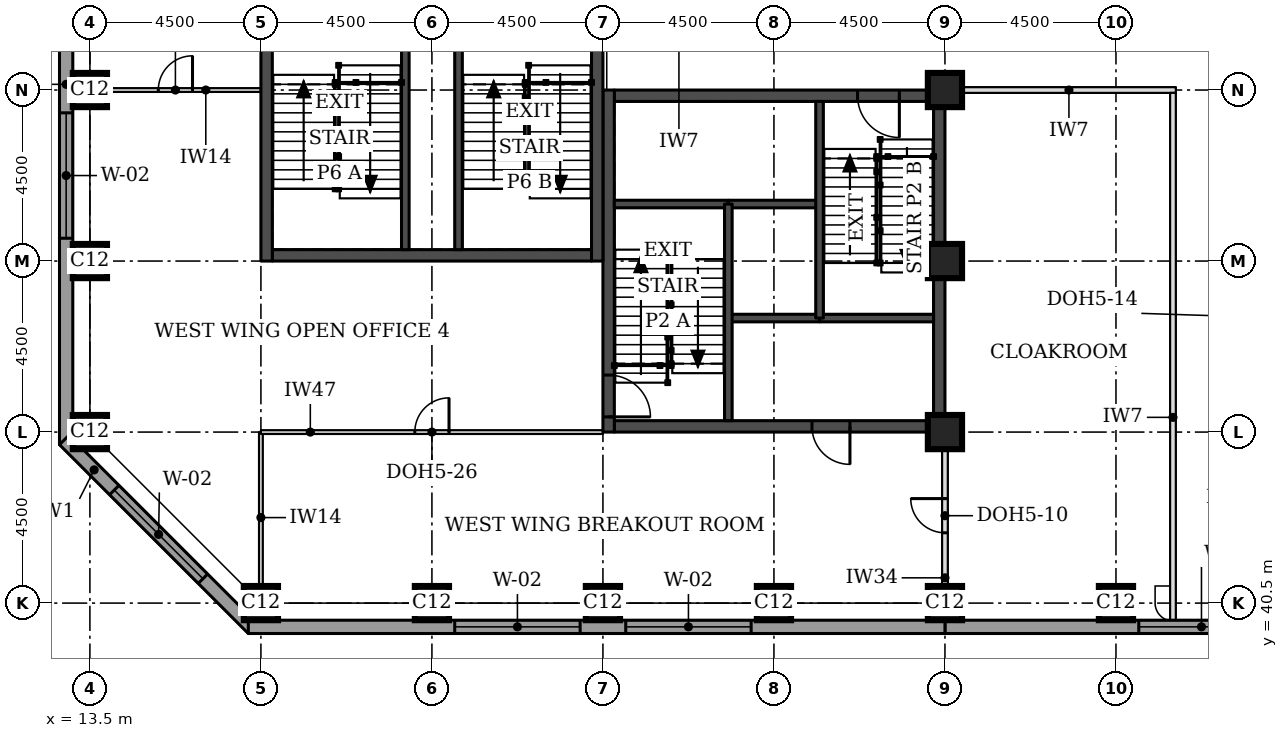
"""IFC4 building model, lengths in metres.
Left out: names, types, materials, properties, quantities, classifications, styles, units other than length and angle.
Written with IfcOpenShell. Run it as: python <this file> out.ifc"""

import sys

from ifc_helpers import new_model, si_unit, direction, frame, frame_2d, origin, origin_2d, place, context, subcontext, project, spatial, rectangle, extrude, element, fill, save


model = new_model("IFC4")
c1 = context("Model", 3, precision=1e-05, world=origin(), true_north=direction((0.0, 1.0)))
c2 = subcontext(c1, "Body", "Model", "MODEL_VIEW")
j1 = project(units=[si_unit("LENGTHUNIT", "METRE"), si_unit("PLANEANGLEUNIT", "RADIAN")], contexts=[c1])
p1 = place(None, origin())
s1 = spatial("IfcSite", under=j1, at=p1, CompositionType="ELEMENT")
p2 = place(p1, origin())
s2 = spatial("IfcBuilding", under=s1, at=p2, CompositionType="ELEMENT")
p3 = place(p2, frame((0.0, 0.0, 181.0)))
s3 = spatial("IfcBuildingStorey", under=s2, at=p3, CompositionType="ELEMENT", Elevation=181.0)
for number, where, z_axis, x_axis in (
    (1, (18.0, 40.5, 0.0), (0.0, 0.0, 1.0), (1.0, 0.0, 0.0)),
    (2, (22.5, 40.5, 0.0), (0.0, 0.0, 1.0), (1.0, 0.0, 0.0)),
    (3, (27.0, 40.5, 0.0), (0.0, 0.0, 1.0), (1.0, 0.0, 0.0)),
    (4, (31.5, 40.5, 0.0), (0.0, 0.0, 1.0), (1.0, 0.0, 0.0)),
    (5, (36.0, 40.5, 0.0), (0.0, 0.0, 1.0), (1.0, 0.0, 0.0)),
    (6, (40.5, 40.5, 0.0), (0.0, 0.0, 1.0), (1.0, 0.0, 0.0)),
    (7, (13.5, 45.0, 0.0), (0.0, 0.0, 1.0), (1.0, 0.0, 0.0)),
    (8, (36.0, 45.0, 0.0), (0.0, 0.0, 1.0), (1.0, 0.0, 0.0)),
    (9, (13.5, 49.5, 0.0), (0.0, 0.0, 1.0), (1.0, 0.0, 0.0)),
    (10, (36.0, 49.5, 0.0), (0.0, 0.0, 1.0), (1.0, 0.0, 0.0)),
    (11, (13.5, 54.0, 0.0), (0.0, 0.0, 1.0), (1.0, 0.0, 0.0)),
    (12, (36.0, 54.0, 0.0), (0.0, 0.0, 1.0), (1.0, 0.0, 0.0)),
):
    element("IfcColumn", number, at=place(p3, frame(where, z_axis=z_axis, x_axis=x_axis)), inside=s3, PredefinedType="COLUMN", context=c2, shape_type="SweptSolid", body=[
        extrude(rectangle(XDim=0.9, YDim=0.9, at=origin_2d()), origin(), (0.0, 0.0, 1.0), 3.7),
    ])
p4 = place(p3, frame((27.3, 45.15, 0.0), z_axis=(0.0, 0.0, 1.0), x_axis=(1.0, 0.0, 0.0)))
e13 = element("IfcWall", 13, at=p4, inside=s3, PredefinedType="SHEAR", context=c2, shape_type="SweptSolid", body=[
    extrude(rectangle(XDim=8.4, YDim=0.3, at=frame_2d((4.2, 0.0))), origin(), (0.0, 0.0, 1.0), 3.7),
])
p5 = place(p4, frame((5.2, 0.0, 0.0)))
e14 = element("IfcOpeningElement", 14, at=p5, cuts=e13, PredefinedType="OPENING", context=c2, shape_type="SweptSolid", body=[
    extrude(rectangle(XDim=1.0, YDim=2.1, at=frame_2d((0.5, 1.05))), frame((0.0, 0.16, 0.0), z_axis=(0.0, -1.0, 0.0), x_axis=(1.0, 0.0, 0.0)), (0.0, 0.0, 1.0), 0.32),
])
p6 = place(p3, frame((27.3, 53.85, 0.0), z_axis=(0.0, 0.0, 1.0), x_axis=(1.0, 0.0, 0.0)))
e15 = element("IfcWall", 15, at=p6, inside=s3, PredefinedType="SHEAR", context=c2, shape_type="SweptSolid", body=[
    extrude(rectangle(XDim=8.4, YDim=0.3, at=frame_2d((4.2, 0.0))), origin(), (0.0, 0.0, 1.0), 3.7),
])
p7 = place(p6, frame((6.4, 0.0, 0.0)))
e16 = element("IfcOpeningElement", 16, at=p7, cuts=e15, PredefinedType="OPENING", context=c2, shape_type="SweptSolid", body=[
    extrude(rectangle(XDim=1.1, YDim=2.1, at=frame_2d((0.55, 1.05))), frame((0.0, 0.16, 0.0), z_axis=(0.0, -1.0, 0.0), x_axis=(1.0, 0.0, 0.0)), (0.0, 0.0, 1.0), 0.32),
])
p8 = place(p3, frame((27.15, 45.0, 0.0), z_axis=(0.0, 0.0, 1.0), x_axis=(0.0, 1.0, 0.0)))
e17 = element("IfcWall", 17, at=p8, inside=s3, PredefinedType="SHEAR", context=c2, shape_type="SweptSolid", body=[
    extrude(rectangle(XDim=9.0, YDim=0.3, at=frame_2d((4.5, 0.0))), origin(), (0.0, 0.0, 1.0), 3.7),
])
p9 = place(p8, frame((0.4, 0.0, 0.0)))
e18 = element("IfcOpeningElement", 18, at=p9, cuts=e17, PredefinedType="OPENING", context=c2, shape_type="SweptSolid", body=[
    extrude(rectangle(XDim=1.1, YDim=2.1, at=frame_2d((0.55, 1.05))), frame((0.0, 0.16, 0.0), z_axis=(0.0, -1.0, 0.0), x_axis=(1.0, 0.0, 0.0)), (0.0, 0.0, 1.0), 0.32),
])
p10 = place(p3, frame((35.85, 45.0, 0.0), z_axis=(0.0, 0.0, 1.0), x_axis=(0.0, 1.0, 0.0)))
e19 = element("IfcWall", 19, at=p10, inside=s3, PredefinedType="SHEAR", context=c2, shape_type="SweptSolid", body=[
    extrude(rectangle(XDim=9.0, YDim=0.3, at=frame_2d((4.5, 0.0))), origin(), (0.0, 0.0, 1.0), 3.7),
])
p11 = place(p3, frame((18.3, 49.65, 0.0), z_axis=(0.0, 0.0, 1.0), x_axis=(1.0, 0.0, 0.0)))
e20 = element("IfcWall", 20, at=p11, inside=s3, PredefinedType="SHEAR", context=c2, shape_type="SweptSolid", body=[
    extrude(rectangle(XDim=8.4, YDim=0.3, at=frame_2d((4.2, 0.0))), origin(), (0.0, 0.0, 1.0), 3.7),
])
p12 = place(p3, frame((18.15, 49.5, 0.0), z_axis=(0.0, 0.0, 1.0), x_axis=(0.0, 1.0, 0.0)))
e21 = element("IfcWall", 21, at=p12, inside=s3, PredefinedType="SHEAR", context=c2, shape_type="SweptSolid", body=[
    extrude(rectangle(XDim=9.0, YDim=0.3, at=frame_2d((4.5, 0.0))), origin(), (0.0, 0.0, 1.0), 3.7),
])
p13 = place(p3, frame((26.85, 49.5, 0.0), z_axis=(0.0, 0.0, 1.0), x_axis=(0.0, 1.0, 0.0)))
e22 = element("IfcWall", 22, at=p13, inside=s3, PredefinedType="SHEAR", context=c2, shape_type="SweptSolid", body=[
    extrude(rectangle(XDim=9.0, YDim=0.3, at=frame_2d((4.5, 0.0))), origin(), (0.0, 0.0, 1.0), 3.7),
])
p14 = place(p13, frame((6.6, 0.0, 0.0)))
e23 = element("IfcOpeningElement", 23, at=p14, cuts=e22, PredefinedType="OPENING", context=c2, shape_type="SweptSolid", body=[
    extrude(rectangle(XDim=1.8, YDim=2.1, at=frame_2d((0.9, 1.05))), frame((0.0, 0.16, 0.0), z_axis=(0.0, -1.0, 0.0), x_axis=(1.0, 0.0, 0.0)), (0.0, 0.0, 1.0), 0.32),
])
p15 = place(p3, frame((36.0, 39.875, 0.0), z_axis=(0.0, 0.0, 1.0), x_axis=(1.0, 0.0, 0.0)))
e24 = element("IfcWall", 24, at=p15, inside=s3, PredefinedType="STANDARD", context=c2, shape_type="SweptSolid", body=[
    extrude(rectangle(XDim=36.331, YDim=0.35, at=frame_2d((18.166, 0.0))), origin(), (0.0, 0.0, 1.0), 3.525),
])
p16 = place(p15, frame((5.1, 0.0, 0.9)))
e25 = element("IfcOpeningElement", 25, at=p16, cuts=e24, PredefinedType="OPENING", context=c2, shape_type="SweptSolid", body=[
    extrude(rectangle(XDim=3.3, YDim=1.9, at=frame_2d((1.65, 0.95))), frame((0.0, 0.185, 0.0), z_axis=(0.0, -1.0, 0.0), x_axis=(1.0, 0.0, 0.0)), (0.0, 0.0, 1.0), 0.37),
])
p17 = place(p15, frame((9.6, 0.0, 0.9)))
e26 = element("IfcOpeningElement", 26, at=p17, cuts=e24, PredefinedType="OPENING", context=c2, shape_type="SweptSolid", body=[
    extrude(rectangle(XDim=3.3, YDim=1.9, at=frame_2d((1.65, 0.95))), frame((0.0, 0.185, 0.0), z_axis=(0.0, -1.0, 0.0), x_axis=(1.0, 0.0, 0.0)), (0.0, 0.0, 1.0), 0.37),
])
p18 = place(p15, frame((14.1, 0.0, 0.9)))
e27 = element("IfcOpeningElement", 27, at=p18, cuts=e24, PredefinedType="OPENING", context=c2, shape_type="SweptSolid", body=[
    extrude(rectangle(XDim=3.3, YDim=1.9, at=frame_2d((1.65, 0.95))), frame((0.0, 0.185, 0.0), z_axis=(0.0, -1.0, 0.0), x_axis=(1.0, 0.0, 0.0)), (0.0, 0.0, 1.0), 0.37),
])
p19 = place(p15, frame((18.6, 0.0, 0.9)))
e28 = element("IfcOpeningElement", 28, at=p19, cuts=e24, PredefinedType="OPENING", context=c2, shape_type="SweptSolid", body=[
    extrude(rectangle(XDim=3.3, YDim=1.9, at=frame_2d((1.65, 0.95))), frame((0.0, 0.185, 0.0), z_axis=(0.0, -1.0, 0.0), x_axis=(1.0, 0.0, 0.0)), (0.0, 0.0, 1.0), 0.37),
])
p20 = place(p15, frame((23.1, 0.0, 0.9)))
e29 = element("IfcOpeningElement", 29, at=p20, cuts=e24, PredefinedType="OPENING", context=c2, shape_type="SweptSolid", body=[
    extrude(rectangle(XDim=3.3, YDim=1.9, at=frame_2d((1.65, 0.95))), frame((0.0, 0.185, 0.0), z_axis=(0.0, -1.0, 0.0), x_axis=(1.0, 0.0, 0.0)), (0.0, 0.0, 1.0), 0.37),
])
p21 = place(p15, frame((27.6, 0.0, 0.9)))
e30 = element("IfcOpeningElement", 30, at=p21, cuts=e24, PredefinedType="OPENING", context=c2, shape_type="SweptSolid", body=[
    extrude(rectangle(XDim=3.3, YDim=1.9, at=frame_2d((1.65, 0.95))), frame((0.0, 0.185, 0.0), z_axis=(0.0, -1.0, 0.0), x_axis=(1.0, 0.0, 0.0)), (0.0, 0.0, 1.0), 0.37),
])
p22 = place(p3, frame((12.875, 58.831, 0.0), z_axis=(0.0, 0.0, 1.0), x_axis=(0.0, -1.0, 0.0)))
e31 = element("IfcWall", 31, at=p22, inside=s3, PredefinedType="STANDARD", context=c2, shape_type="SweptSolid", body=[
    extrude(rectangle(XDim=14.163, YDim=0.35, at=frame_2d((7.081, 0.0))), origin(), (0.0, 0.0, 1.0), 3.525),
])
p23 = place(p22, frame((5.431, 0.0, 0.9)))
e32 = element("IfcOpeningElement", 32, at=p23, cuts=e31, PredefinedType="OPENING", context=c2, shape_type="SweptSolid", body=[
    extrude(rectangle(XDim=3.3, YDim=1.9, at=frame_2d((1.65, 0.95))), frame((0.0, 0.185, 0.0), z_axis=(0.0, -1.0, 0.0), x_axis=(1.0, 0.0, 0.0)), (0.0, 0.0, 1.0), 0.37),
])
p24 = place(p3, frame((12.824, 44.792, 0.0), z_axis=(0.0, 0.0, 1.0), x_axis=(0.707106781187, -0.707106781187, 0.0)))
e33 = element("IfcWall", 33, at=p24, inside=s3, PredefinedType="STANDARD", context=c2, shape_type="SweptSolid", body=[
    extrude(rectangle(XDim=7.027, YDim=0.35, at=frame_2d((3.513, 0.0))), origin(), (0.0, 0.0, 1.0), 3.525),
])
p25 = place(p24, frame((1.863, 0.0, 0.9)))
e34 = element("IfcOpeningElement", 34, at=p25, cuts=e33, PredefinedType="OPENING", context=c2, shape_type="SweptSolid", body=[
    extrude(rectangle(XDim=3.3, YDim=1.9, at=frame_2d((1.65, 0.95))), frame((0.0, 0.185, 0.0), z_axis=(0.0, -1.0, 0.0), x_axis=(1.0, 0.0, 0.0)), (0.0, 0.0, 1.0), 0.37),
])
p26 = place(p3, frame((17.669, 39.875, 0.0), z_axis=(0.0, 0.0, 1.0), x_axis=(1.0, 0.0, 0.0)))
e35 = element("IfcWall", 35, at=p26, inside=s3, PredefinedType="STANDARD", context=c2, shape_type="SweptSolid", body=[
    extrude(rectangle(XDim=18.331, YDim=0.35, at=frame_2d((9.166, 0.0))), origin(), (0.0, 0.0, 1.0), 3.525),
])
p27 = place(p26, frame((5.431, 0.0, 0.9)))
e36 = element("IfcOpeningElement", 36, at=p27, cuts=e35, PredefinedType="OPENING", context=c2, shape_type="SweptSolid", body=[
    extrude(rectangle(XDim=3.3, YDim=1.9, at=frame_2d((1.65, 0.95))), frame((0.0, 0.185, 0.0), z_axis=(0.0, -1.0, 0.0), x_axis=(1.0, 0.0, 0.0)), (0.0, 0.0, 1.0), 0.37),
])
p28 = place(p26, frame((9.931, 0.0, 0.9)))
e37 = element("IfcOpeningElement", 37, at=p28, cuts=e35, PredefinedType="OPENING", context=c2, shape_type="SweptSolid", body=[
    extrude(rectangle(XDim=3.3, YDim=1.9, at=frame_2d((1.65, 0.95))), frame((0.0, 0.185, 0.0), z_axis=(0.0, -1.0, 0.0), x_axis=(1.0, 0.0, 0.0)), (0.0, 0.0, 1.0), 0.37),
])
p29 = place(p3, frame((36.45, 54.0, 0.0), z_axis=(0.0, 0.0, 1.0), x_axis=(1.0, 0.0, 0.0)))
e38 = element("IfcWall", 38, at=p29, inside=s3, PredefinedType="PARTITIONING", context=c2, shape_type="SweptSolid", body=[
    extrude(rectangle(XDim=5.625, YDim=0.15, at=frame_2d((2.812, 0.0))), origin(), (0.0, 0.0, 1.0), 3.55),
])
p30 = place(p3, frame((42.0, 40.05, 0.0), z_axis=(0.0, 0.0, 1.0), x_axis=(0.0, 1.0, 0.0)))
e39 = element("IfcWall", 39, at=p30, inside=s3, PredefinedType="PARTITIONING", context=c2, shape_type="SweptSolid", body=[
    extrude(rectangle(XDim=13.875, YDim=0.15, at=frame_2d((6.938, 0.0))), origin(), (0.0, 0.0, 1.0), 3.55),
])
p31 = place(p3, frame((36.0, 40.95, 0.0), z_axis=(0.0, 0.0, 1.0), x_axis=(0.0, 1.0, 0.0)))
e40 = element("IfcWall", 40, at=p31, inside=s3, PredefinedType="PARTITIONING", context=c2, shape_type="SweptSolid", body=[
    extrude(rectangle(XDim=3.63, YDim=0.15, at=frame_2d((1.815, 0.0))), origin(), (0.0, 0.0, 1.0), 2.8),
])
p32 = place(p31, frame((1.4, 0.0, 0.0)))
e41 = element("IfcOpeningElement", 41, at=p32, cuts=e40, PredefinedType="OPENING", context=c2, shape_type="SweptSolid", body=[
    extrude(rectangle(XDim=0.9, YDim=2.1, at=frame_2d((0.45, 1.05))), frame((0.0, 0.085, 0.0), z_axis=(0.0, -1.0, 0.0), x_axis=(1.0, 0.0, 0.0)), (0.0, 0.0, 1.0), 0.17),
])
p33 = place(p3, frame((13.5, 54.0, 0.0), z_axis=(0.0, 0.0, 1.0), x_axis=(1.0, 0.0, 0.0)))
e42 = element("IfcWall", 42, at=p33, inside=s3, PredefinedType="PARTITIONING", context=c2, shape_type="SweptSolid", body=[
    extrude(rectangle(XDim=4.5, YDim=0.1, at=frame_2d((2.25, 0.0))), origin(), (0.0, 0.0, 1.0), 3.55),
])
p34 = place(p33, frame((1.8, 0.0, 0.0)))
e43 = element("IfcOpeningElement", 43, at=p34, cuts=e42, PredefinedType="OPENING", context=c2, shape_type="SweptSolid", body=[
    extrude(rectangle(XDim=0.9, YDim=2.1, at=frame_2d((0.45, 1.05))), frame((0.0, 0.06, 0.0), z_axis=(0.0, -1.0, 0.0), x_axis=(1.0, 0.0, 0.0)), (0.0, 0.0, 1.0), 0.12),
])
p35 = place(p3, frame((18.0, 40.5, 0.0), z_axis=(0.0, 0.0, 1.0), x_axis=(0.0, 1.0, 0.0)))
e44 = element("IfcWall", 44, at=p35, inside=s3, PredefinedType="PARTITIONING", context=c2, shape_type="SweptSolid", body=[
    extrude(rectangle(XDim=4.5, YDim=0.1, at=frame_2d((2.25, 0.0))), origin(), (0.0, 0.0, 1.0), 3.55),
])
p36 = place(p3, frame((18.0, 45.0, 0.0), z_axis=(0.0, 0.0, 1.0), x_axis=(1.0, 0.0, 0.0)))
e45 = element("IfcWall", 45, at=p36, inside=s3, PredefinedType="PARTITIONING", context=c2, shape_type="SweptSolid", body=[
    extrude(rectangle(XDim=9.0, YDim=0.1, at=frame_2d((4.5, 0.0))), origin(), (0.0, 0.0, 1.0), 2.55),
])
p37 = place(p36, frame((4.05, 0.0, 0.0)))
e46 = element("IfcOpeningElement", 46, at=p37, cuts=e45, PredefinedType="OPENING", context=c2, shape_type="SweptSolid", body=[
    extrude(rectangle(XDim=0.9, YDim=2.1, at=frame_2d((0.45, 1.05))), frame((0.0, 0.06, 0.0), z_axis=(0.0, -1.0, 0.0), x_axis=(1.0, 0.0, 0.0)), (0.0, 0.0, 1.0), 0.12),
])
p38 = place(p3, frame((30.3, 48.0, 0.0), z_axis=(0.0, 0.0, 1.0), x_axis=(1.0, 0.0, 0.0)))
e47 = element("IfcWall", 47, at=p38, inside=s3, PredefinedType="SOLIDWALL", context=c2, shape_type="SweptSolid", body=[
    extrude(rectangle(XDim=2.4, YDim=0.2, at=frame_2d((1.2, 0.0))), origin(), (0.0, 0.0, 1.0), 3.55),
])
p39 = place(p3, frame((32.7, 48.0, 0.0), z_axis=(0.0, 0.0, 1.0), x_axis=(1.0, 0.0, 0.0)))
e48 = element("IfcWall", 48, at=p39, inside=s3, PredefinedType="SOLIDWALL", context=c2, shape_type="SweptSolid", body=[
    extrude(rectangle(XDim=3.0, YDim=0.2, at=frame_2d((1.5, 0.0))), origin(), (0.0, 0.0, 1.0), 3.55),
])
p40 = place(p3, frame((30.3, 51.0, 0.0), z_axis=(0.0, 0.0, 1.0), x_axis=(1.0, 0.0, 0.0)))
e49 = element("IfcWall", 49, at=p40, inside=s3, PredefinedType="SOLIDWALL", context=c2, shape_type="SweptSolid", body=[
    extrude(rectangle(XDim=2.4, YDim=0.2, at=frame_2d((1.2, 0.0))), origin(), (0.0, 0.0, 1.0), 3.7),
])
p41 = place(p3, frame((27.3, 51.0, 0.0), z_axis=(0.0, 0.0, 1.0), x_axis=(1.0, 0.0, 0.0)))
e50 = element("IfcWall", 50, at=p41, inside=s3, PredefinedType="SOLIDWALL", context=c2, shape_type="SweptSolid", body=[
    extrude(rectangle(XDim=3.0, YDim=0.2, at=frame_2d((1.5, 0.0))), origin(), (0.0, 0.0, 1.0), 3.55),
])
for number, where, z_axis, x_axis in (
    (51, (30.3, 45.3, 0.0), (0.0, 0.0, 1.0), (0.0, 1.0, 0.0)),
    (52, (32.7, 48.0, 0.0), (0.0, 0.0, 1.0), (0.0, 1.0, 0.0)),
):
    element("IfcWall", number, at=place(p3, frame(where, z_axis=z_axis, x_axis=x_axis)), inside=s3, PredefinedType="SOLIDWALL", context=c2, shape_type="SweptSolid", body=[
        extrude(rectangle(XDim=5.7, YDim=0.2, at=frame_2d((2.85, 0.0))), origin(), (0.0, 0.0, 1.0), 3.55),
    ])
for number, where, z_axis, x_axis in (
    (53, (21.8, 49.8, 0.0), (0.0, 0.0, 1.0), (0.0, 1.0, 0.0)),
    (54, (23.2, 49.8, 0.0), (0.0, 0.0, 1.0), (0.0, 1.0, 0.0)),
):
    element("IfcWall", number, at=place(p3, frame(where, z_axis=z_axis, x_axis=x_axis)), inside=s3, PredefinedType="SOLIDWALL", context=c2, shape_type="SweptSolid", body=[
        extrude(rectangle(XDim=6.05, YDim=0.2, at=frame_2d((3.025, 0.0))), origin(), (0.0, 0.0, 1.0), 3.55),
    ])
p42 = place(p16, origin())
e55 = element("IfcWindow", 55, at=p42, inside=s3, PartitioningType="SINGLE_PANEL", PredefinedType="WINDOW", context=c2, shape_type="SweptSolid", body=[
    extrude(rectangle(XDim=3.3, YDim=1.9, at=frame_2d((1.65, 0.95))), frame((0.0, 0.085, 0.0), z_axis=(0.0, -1.0, 0.0), x_axis=(1.0, 0.0, 0.0)), (0.0, 0.0, 1.0), 0.06),
])
fill(e25, e55)
p43 = place(p23, origin())
e56 = element("IfcWindow", 56, at=p43, inside=s3, PartitioningType="SINGLE_PANEL", PredefinedType="WINDOW", context=c2, shape_type="SweptSolid", body=[
    extrude(rectangle(XDim=3.3, YDim=1.9, at=frame_2d((1.65, 0.95))), frame((0.0, 0.085, 0.0), z_axis=(0.0, -1.0, 0.0), x_axis=(1.0, 0.0, 0.0)), (0.0, 0.0, 1.0), 0.06),
])
fill(e32, e56)
p44 = place(p25, origin())
e57 = element("IfcWindow", 57, at=p44, inside=s3, PartitioningType="SINGLE_PANEL", PredefinedType="WINDOW", context=c2, shape_type="SweptSolid", body=[
    extrude(rectangle(XDim=3.3, YDim=1.9, at=frame_2d((1.65, 0.95))), frame((0.0, 0.085, 0.0), z_axis=(0.0, -1.0, 0.0), x_axis=(1.0, 0.0, 0.0)), (0.0, 0.0, 1.0), 0.06),
])
fill(e34, e57)
p45 = place(p27, origin())
e58 = element("IfcWindow", 58, at=p45, inside=s3, PartitioningType="SINGLE_PANEL", PredefinedType="WINDOW", context=c2, shape_type="SweptSolid", body=[
    extrude(rectangle(XDim=3.3, YDim=1.9, at=frame_2d((1.65, 0.95))), frame((0.0, 0.085, 0.0), z_axis=(0.0, -1.0, 0.0), x_axis=(1.0, 0.0, 0.0)), (0.0, 0.0, 1.0), 0.06),
])
fill(e36, e58)
p46 = place(p28, origin())
e59 = element("IfcWindow", 59, at=p46, inside=s3, PartitioningType="SINGLE_PANEL", PredefinedType="WINDOW", context=c2, shape_type="SweptSolid", body=[
    extrude(rectangle(XDim=3.3, YDim=1.9, at=frame_2d((1.65, 0.95))), frame((0.0, 0.085, 0.0), z_axis=(0.0, -1.0, 0.0), x_axis=(1.0, 0.0, 0.0)), (0.0, 0.0, 1.0), 0.06),
])
fill(e37, e59)
p47 = place(p32, origin())
e60 = element("IfcDoor", 60, at=p47, inside=s3, OperationType="SINGLE_SWING_RIGHT", PredefinedType="DOOR", context=c2, shape_type="SweptSolid", body=[
    extrude(rectangle(XDim=0.9, YDim=2.1, at=frame_2d((0.45, 1.05))), frame((0.0, 0.025, 0.0), z_axis=(0.0, -1.0, 0.0), x_axis=(1.0, 0.0, 0.0)), (0.0, 0.0, 1.0), 0.05),
])
fill(e41, e60)
p48 = place(p34, origin())
e61 = element("IfcDoor", 61, at=p48, inside=s3, OperationType="SINGLE_SWING_RIGHT", PredefinedType="DOOR", context=c2, shape_type="SweptSolid", body=[
    extrude(rectangle(XDim=0.9, YDim=2.1, at=frame_2d((0.45, 1.05))), frame((0.0, 0.025, 0.0), z_axis=(0.0, -1.0, 0.0), x_axis=(1.0, 0.0, 0.0)), (0.0, 0.0, 1.0), 0.05),
])
fill(e43, e61)
p49 = place(p37, origin())
e62 = element("IfcDoor", 62, at=p49, inside=s3, OperationType="SINGLE_SWING_RIGHT", PredefinedType="DOOR", context=c2, shape_type="SweptSolid", body=[
    extrude(rectangle(XDim=0.9, YDim=2.1, at=frame_2d((0.45, 1.05))), frame((0.0, 0.025, 0.0), z_axis=(0.0, -1.0, 0.0), x_axis=(1.0, 0.0, 0.0)), (0.0, 0.0, 1.0), 0.05),
])
fill(e46, e62)
p50 = place(p9, frame((1.1, 0.0, 0.0), z_axis=(0.0, 0.0, 1.0), x_axis=(-1.0, 0.0, 0.0)))
e63 = element("IfcDoor", 63, at=p50, inside=s3, OperationType="SINGLE_SWING_RIGHT", PredefinedType="DOOR", context=c2, shape_type="SweptSolid", body=[
    extrude(rectangle(XDim=1.1, YDim=2.1, at=frame_2d((0.55, 1.05))), frame((0.0, 0.025, 0.0), z_axis=(0.0, -1.0, 0.0), x_axis=(1.0, 0.0, 0.0)), (0.0, 0.0, 1.0), 0.05),
])
fill(e18, e63)
p51 = place(p7, frame((1.1, 0.0, 0.0), z_axis=(0.0, 0.0, 1.0), x_axis=(-1.0, 0.0, 0.0)))
e64 = element("IfcDoor", 64, at=p51, inside=s3, OperationType="SINGLE_SWING_LEFT", PredefinedType="DOOR", context=c2, shape_type="SweptSolid", body=[
    extrude(rectangle(XDim=1.1, YDim=2.1, at=frame_2d((0.55, 1.05))), frame((0.0, 0.025, 0.0), z_axis=(0.0, -1.0, 0.0), x_axis=(1.0, 0.0, 0.0)), (0.0, 0.0, 1.0), 0.05),
])
fill(e16, e64)
p52 = place(p5, frame((1.0, 0.0, 0.0), z_axis=(0.0, 0.0, 1.0), x_axis=(-1.0, 0.0, 0.0)))
e65 = element("IfcDoor", 65, at=p52, inside=s3, OperationType="SINGLE_SWING_LEFT", PredefinedType="DOOR", context=c2, shape_type="SweptSolid", body=[
    extrude(rectangle(XDim=1.0, YDim=2.1, at=frame_2d((0.5, 1.05))), frame((0.0, 0.025, 0.0), z_axis=(0.0, -1.0, 0.0), x_axis=(1.0, 0.0, 0.0)), (0.0, 0.0, 1.0), 0.05),
])
fill(e14, e65)
save(model, sys.argv[1])
